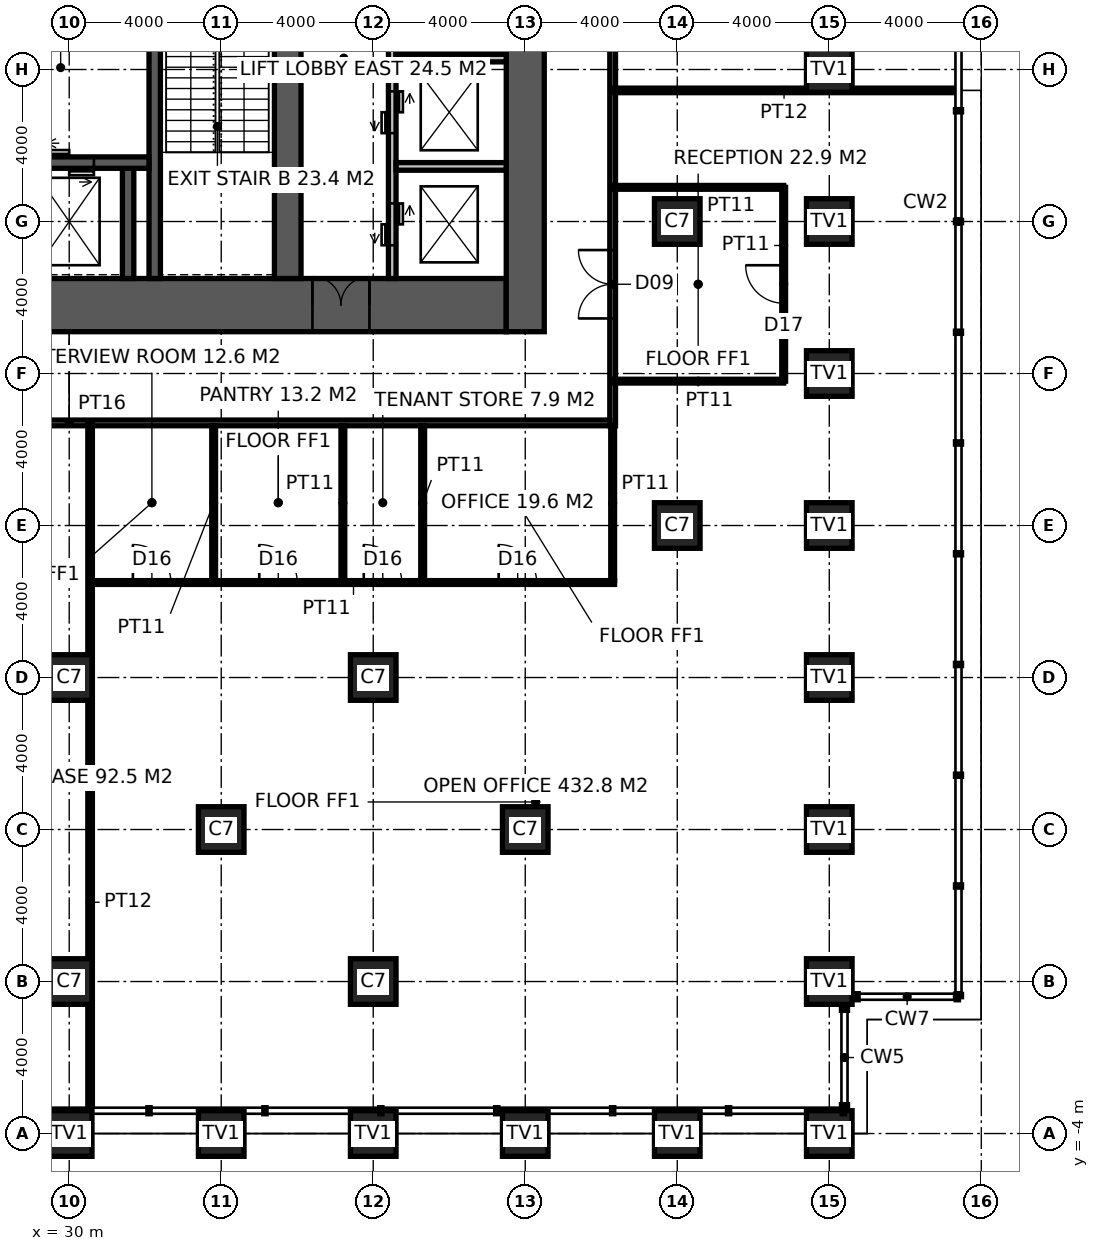
"""IFC4 building model, lengths in metres.
Left out: names, types, materials, properties, quantities, classifications, styles, units other than length and angle.
Written with IfcOpenShell. Run it as: python <this file> out.ifc"""

import sys

from ifc_helpers import new_model, si_unit, direction, frame, frame_2d, origin, origin_2d, place, context, subcontext, project, spatial, rectangle, hollow_rectangle, extrude, element, fill, save


model = new_model("IFC4")
c1 = context("Model", 3, precision=1e-05, world=origin(), true_north=direction((0.0, 1.0)))
c2 = subcontext(c1, "Body", "Model", "MODEL_VIEW")
j1 = project(units=[si_unit("LENGTHUNIT", "METRE"), si_unit("PLANEANGLEUNIT", "RADIAN")], contexts=[c1])
p1 = place(None, origin())
s1 = spatial("IfcSite", under=j1, at=p1, CompositionType="ELEMENT")
p2 = place(p1, origin())
s2 = spatial("IfcBuilding", under=s1, at=p2, CompositionType="ELEMENT")
p3 = place(p2, frame((0.0, 0.0, 11.0)))
s3 = spatial("IfcBuildingStorey", under=s2, at=p3, CompositionType="ELEMENT", Elevation=11.0)
for number, where, z_axis, x_axis in (
    (1, (30.0, -4.0, 0.0), (0.0, 0.0, 1.0), (1.0, 0.0, 0.0)),
    (2, (34.0, -4.0, 0.0), (0.0, 0.0, 1.0), (1.0, 0.0, 0.0)),
    (3, (38.0, -4.0, 0.0), (0.0, 0.0, 1.0), (1.0, 0.0, 0.0)),
    (4, (42.0, -4.0, 0.0), (0.0, 0.0, 1.0), (1.0, 0.0, 0.0)),
    (5, (46.0, -4.0, 0.0), (0.0, 0.0, 1.0), (1.0, 0.0, 0.0)),
    (6, (50.0, -4.0, 0.0), (0.0, 0.0, 1.0), (1.0, 0.0, 0.0)),
    (7, (50.0, 0.0, 0.0), (0.0, 0.0, 1.0), (1.0, 0.0, 0.0)),
    (8, (50.0, 4.0, 0.0), (0.0, 0.0, 1.0), (1.0, 0.0, 0.0)),
    (9, (50.0, 8.0, 0.0), (0.0, 0.0, 1.0), (1.0, 0.0, 0.0)),
    (10, (50.0, 12.0, 0.0), (0.0, 0.0, 1.0), (1.0, 0.0, 0.0)),
    (11, (50.0, 16.0, 0.0), (0.0, 0.0, 1.0), (1.0, 0.0, 0.0)),
    (12, (50.0, 20.0, 0.0), (0.0, 0.0, 1.0), (1.0, 0.0, 0.0)),
    (13, (50.0, 24.0, 0.0), (0.0, 0.0, 1.0), (1.0, 0.0, 0.0)),
):
    element("IfcColumn", number, at=place(p3, frame(where, z_axis=z_axis, x_axis=x_axis)), inside=s3, PredefinedType="USERDEFINED", context=c2, shape_type="SweptSolid", body=[
        extrude(hollow_rectangle(XDim=1.2, YDim=1.2, WallThickness=0.1, at=origin_2d()), origin(), (0.0, 0.0, 1.0), 4.0),
    ])
for number, where, z_axis, x_axis in (
    (14, (30.0, 0.0, 0.0), (0.0, 0.0, 1.0), (1.0, 0.0, 0.0)),
    (15, (30.0, 8.0, 0.0), (0.0, 0.0, 1.0), (1.0, 0.0, 0.0)),
    (16, (34.0, 4.0, 0.0), (0.0, 0.0, 1.0), (1.0, 0.0, 0.0)),
    (17, (38.0, 0.0, 0.0), (0.0, 0.0, 1.0), (1.0, 0.0, 0.0)),
    (18, (38.0, 8.0, 0.0), (0.0, 0.0, 1.0), (1.0, 0.0, 0.0)),
    (19, (42.0, 4.0, 0.0), (0.0, 0.0, 1.0), (1.0, 0.0, 0.0)),
    (20, (46.0, 12.0, 0.0), (0.0, 0.0, 1.0), (1.0, 0.0, 0.0)),
    (21, (46.0, 20.0, 0.0), (0.0, 0.0, 1.0), (1.0, 0.0, 0.0)),
):
    element("IfcColumn", number, at=place(p3, frame(where, z_axis=z_axis, x_axis=x_axis)), inside=s3, PredefinedType="COLUMN", context=c2, shape_type="SweptSolid", body=[
        extrude(hollow_rectangle(XDim=1.2, YDim=1.2, WallThickness=0.1, at=origin_2d()), origin(), (0.0, 0.0, 1.0), 4.0),
    ])
p4 = place(p3, frame((18.5, 17.8, -0.15), z_axis=(0.0, 0.0, 1.0), x_axis=(1.0, 0.0, 0.0)))
e22 = element("IfcWall", 22, at=p4, inside=s3, PredefinedType="SHEAR", context=c2, shape_type="SweptSolid", body=[
    extrude(rectangle(XDim=23.0, YDim=1.4, at=frame_2d((11.5, 0.0))), origin(), (0.0, 0.0, 1.0), 4.0),
])
p5 = place(p4, frame((3.45, 0.0, 0.15)))
e23 = element("IfcOpeningElement", 23, at=p5, cuts=e22, PredefinedType="OPENING", context=c2, shape_type="SweptSolid", body=[
    extrude(rectangle(XDim=1.5, YDim=2.4, at=frame_2d((0.75, 1.2))), frame((0.0, 0.71, 0.0), z_axis=(0.0, -1.0, 0.0), x_axis=(1.0, 0.0, 0.0)), (0.0, 0.0, 1.0), 1.42),
])
p6 = place(p4, frame((17.9, 0.0, 0.15)))
e24 = element("IfcOpeningElement", 24, at=p6, cuts=e22, PredefinedType="OPENING", context=c2, shape_type="SweptSolid", body=[
    extrude(rectangle(XDim=1.5, YDim=2.4, at=frame_2d((0.75, 1.2))), frame((0.0, 0.71, 0.0), z_axis=(0.0, -1.0, 0.0), x_axis=(1.0, 0.0, 0.0)), (0.0, 0.0, 1.0), 1.42),
])
p7 = place(p4, frame((0.9, 0.0, 0.15)))
e25 = element("IfcOpeningElement", 25, at=p7, cuts=e22, PredefinedType="OPENING", context=c2, shape_type="SweptSolid", body=[
    extrude(rectangle(XDim=1.0, YDim=2.2, at=frame_2d((0.5, 1.1))), frame((0.0, 0.71, 0.0), z_axis=(0.0, -1.0, 0.0), x_axis=(1.0, 0.0, 0.0)), (0.0, 0.0, 1.0), 1.42),
])
p8 = place(p3, frame((42.0, 17.1, -0.15), z_axis=(0.0, 0.0, 1.0), x_axis=(0.0, 1.0, 0.0)))
e26 = element("IfcWall", 26, at=p8, inside=s3, PredefinedType="SHEAR", context=c2, shape_type="SweptSolid", body=[
    extrude(rectangle(XDim=19.8, YDim=1.0, at=frame_2d((9.9, 0.0))), origin(), (0.0, 0.0, 1.0), 4.0),
])
p9 = place(p3, frame((35.75, 18.5, -0.15), z_axis=(0.0, 0.0, 1.0), x_axis=(0.0, 1.0, 0.0)))
e27 = element("IfcWall", 27, at=p9, inside=s3, PredefinedType="SHEAR", context=c2, shape_type="SweptSolid", body=[
    extrude(rectangle(XDim=17.0, YDim=0.7, at=frame_2d((8.5, 0.0))), origin(), (0.0, 0.0, 1.0), 4.0),
])
p10 = place(p9, frame((9.85, 0.0, 0.15)))
e28 = element("IfcOpeningElement", 28, at=p10, cuts=e27, PredefinedType="OPENING", context=c2, shape_type="SweptSolid", body=[
    extrude(rectangle(XDim=1.0, YDim=2.2, at=frame_2d((0.5, 1.1))), frame((0.0, 0.36, 0.0), z_axis=(0.0, -1.0, 0.0), x_axis=(1.0, 0.0, 0.0)), (0.0, 0.0, 1.0), 0.72),
])
p11 = place(p3, frame((32.25, 18.5, -0.15), z_axis=(0.0, 0.0, 1.0), x_axis=(0.0, 1.0, 0.0)))
e29 = element("IfcWall", 29, at=p11, inside=s3, PredefinedType="SHEAR", context=c2, shape_type="SweptSolid", body=[
    extrude(rectangle(XDim=7.9, YDim=0.3, at=frame_2d((3.95, 0.0))), origin(), (0.0, 0.0, 1.0), 4.0),
])
p12 = place(p3, frame((31.55, 18.5, -0.15), z_axis=(0.0, 0.0, 1.0), x_axis=(0.0, 1.0, 0.0)))
e30 = element("IfcWall", 30, at=p12, inside=s3, PredefinedType="SHEAR", context=c2, shape_type="SweptSolid", body=[
    extrude(rectangle(XDim=2.9, YDim=0.3, at=frame_2d((1.45, 0.0))), origin(), (0.0, 0.0, 1.0), 4.0),
])
p13 = place(p3, frame((28.3, 21.55, -0.15), z_axis=(0.0, 0.0, 1.0), x_axis=(1.0, 0.0, 0.0)))
e31 = element("IfcWall", 31, at=p13, inside=s3, PredefinedType="SHEAR", context=c2, shape_type="SweptSolid", body=[
    extrude(rectangle(XDim=3.8, YDim=0.3, at=frame_2d((1.9, 0.0))), origin(), (0.0, 0.0, 1.0), 4.0),
])
p14 = place(p13, frame((1.05, 0.0, 0.15)))
e32 = element("IfcOpeningElement", 32, at=p14, cuts=e31, PredefinedType="OPENING", context=c2, shape_type="SweptSolid", body=[
    extrude(rectangle(XDim=1.3, YDim=2.4, at=frame_2d((0.65, 1.2))), frame((0.0, 0.16, 0.0), z_axis=(0.0, -1.0, 0.0), x_axis=(1.0, 0.0, 0.0)), (0.0, 0.0, 1.0), 0.32),
])
p15 = place(p3, frame((38.5, 18.5, -0.15), z_axis=(0.0, 0.0, 1.0), x_axis=(0.0, 1.0, 0.0)))
e33 = element("IfcWall", 33, at=p15, inside=s3, PredefinedType="SOLIDWALL", context=c2, shape_type="SweptSolid", body=[
    extrude(rectangle(XDim=11.5, YDim=0.2, at=frame_2d((5.75, 0.0))), origin(), (0.0, 0.0, 1.0), 4.0),
])
p16 = place(p15, frame((0.875, 0.0, 0.15)))
e34 = element("IfcOpeningElement", 34, at=p16, cuts=e33, PredefinedType="OPENING", context=c2, shape_type="SweptSolid", body=[
    extrude(rectangle(XDim=1.1, YDim=2.2, at=frame_2d((0.55, 1.1))), frame((0.0, 0.11, 0.0), z_axis=(0.0, -1.0, 0.0), x_axis=(1.0, 0.0, 0.0)), (0.0, 0.0, 1.0), 0.22),
])
p17 = place(p15, frame((3.825, 0.0, 0.15)))
e35 = element("IfcOpeningElement", 35, at=p17, cuts=e33, PredefinedType="OPENING", context=c2, shape_type="SweptSolid", body=[
    extrude(rectangle(XDim=1.1, YDim=2.2, at=frame_2d((0.55, 1.1))), frame((0.0, 0.11, 0.0), z_axis=(0.0, -1.0, 0.0), x_axis=(1.0, 0.0, 0.0)), (0.0, 0.0, 1.0), 0.22),
])
p18 = place(p15, frame((6.675, 0.0, 0.15)))
e36 = element("IfcOpeningElement", 36, at=p18, cuts=e33, PredefinedType="OPENING", context=c2, shape_type="SweptSolid", body=[
    extrude(rectangle(XDim=1.1, YDim=2.2, at=frame_2d((0.55, 1.1))), frame((0.0, 0.11, 0.0), z_axis=(0.0, -1.0, 0.0), x_axis=(1.0, 0.0, 0.0)), (0.0, 0.0, 1.0), 0.22),
])
p19 = place(p15, frame((9.575, 0.0, 0.15)))
e37 = element("IfcOpeningElement", 37, at=p19, cuts=e33, PredefinedType="OPENING", context=c2, shape_type="SweptSolid", body=[
    extrude(rectangle(XDim=1.1, YDim=2.2, at=frame_2d((0.55, 1.1))), frame((0.0, 0.11, 0.0), z_axis=(0.0, -1.0, 0.0), x_axis=(1.0, 0.0, 0.0)), (0.0, 0.0, 1.0), 0.22),
])
for number, where, z_axis, x_axis in (
    (38, (38.6, 21.45, -0.15), (0.0, 0.0, 1.0), (1.0, 0.0, 0.0)),
    (39, (38.6, 24.3, -0.15), (0.0, 0.0, 1.0), (1.0, 0.0, 0.0)),
):
    element("IfcWall", number, at=place(p3, frame(where, z_axis=z_axis, x_axis=x_axis)), inside=s3, PredefinedType="SOLIDWALL", context=c2, shape_type="SweptSolid", body=[
        extrude(rectangle(XDim=2.9, YDim=0.2, at=frame_2d((1.45, 0.0))), origin(), (0.0, 0.0, 1.0), 4.0),
    ])
p20 = place(p3, frame((44.3, 14.625, 0.0), z_axis=(0.0, 0.0, 1.0), x_axis=(0.0, 1.0, 0.0)))
e40 = element("IfcWall", 40, at=p20, inside=s3, PredefinedType="PARTITIONING", context=c2, shape_type="SweptSolid", body=[
    extrude(rectangle(XDim=24.15, YDim=0.15, at=frame_2d((12.075, 0.0))), origin(), (0.0, 0.0, 1.0), 3.85),
])
p21 = place(p20, frame((2.824, 0.0, 0.0)))
e41 = element("IfcOpeningElement", 41, at=p21, cuts=e40, PredefinedType="OPENING", context=c2, shape_type="SweptSolid", body=[
    extrude(rectangle(XDim=1.8, YDim=2.4, at=frame_2d((0.9, 1.2))), frame((0.0, 0.085, 0.0), z_axis=(0.0, -1.0, 0.0), x_axis=(1.0, 0.0, 0.0)), (0.0, 0.0, 1.0), 0.17),
])
p22 = place(p20, frame((18.075, 0.0, 0.0)))
e42 = element("IfcOpeningElement", 42, at=p22, cuts=e40, PredefinedType="OPENING", context=c2, shape_type="SweptSolid", body=[
    extrude(rectangle(XDim=1.8, YDim=2.4, at=frame_2d((0.9, 1.2))), frame((0.0, 0.085, 0.0), z_axis=(0.0, -1.0, 0.0), x_axis=(1.0, 0.0, 0.0)), (0.0, 0.0, 1.0), 0.17),
])
p23 = place(p20, frame((10.875, 0.0, 0.0)))
e43 = element("IfcOpeningElement", 43, at=p23, cuts=e40, PredefinedType="OPENING", context=c2, shape_type="SweptSolid", body=[
    extrude(rectangle(XDim=1.0, YDim=2.2, at=frame_2d((0.5, 1.1))), frame((0.0, 0.085, 0.0), z_axis=(0.0, -1.0, 0.0), x_axis=(1.0, 0.0, 0.0)), (0.0, 0.0, 1.0), 0.17),
])
p24 = place(p3, frame((15.775, 14.7, 0.0), z_axis=(0.0, 0.0, 1.0), x_axis=(1.0, 0.0, 0.0)))
e44 = element("IfcWall", 44, at=p24, inside=s3, PredefinedType="PARTITIONING", context=c2, shape_type="SweptSolid", body=[
    extrude(rectangle(XDim=28.45, YDim=0.15, at=frame_2d((14.225, 0.0))), origin(), (0.0, 0.0, 1.0), 3.85),
])
p25 = place(p24, frame((11.725, 0.0, 0.0)))
e45 = element("IfcOpeningElement", 45, at=p25, cuts=e44, PredefinedType="OPENING", context=c2, shape_type="SweptSolid", body=[
    extrude(rectangle(XDim=1.0, YDim=2.2, at=frame_2d((0.5, 1.1))), frame((0.0, 0.085, 0.0), z_axis=(0.0, -1.0, 0.0), x_axis=(1.0, 0.0, 0.0)), (0.0, 0.0, 1.0), 0.17),
])
p26 = place(p3, frame((30.55, -3.32, 0.0), z_axis=(0.0, 0.0, 1.0), x_axis=(0.0, 1.0, 0.0)))
e46 = element("IfcWall", 46, at=p26, inside=s3, PredefinedType="PARTITIONING", context=c2, shape_type="SweptSolid", body=[
    extrude(rectangle(XDim=18.02, YDim=0.12, at=frame_2d((9.01, 0.0))), origin(), (0.0, 0.0, 1.0), 2.65),
])
p27 = place(p3, frame((44.3, 23.45, 0.0), z_axis=(0.0, 0.0, 1.0), x_axis=(1.0, 0.0, 0.0)))
e47 = element("IfcWall", 47, at=p27, inside=s3, PredefinedType="PARTITIONING", context=c2, shape_type="SweptSolid", body=[
    extrude(rectangle(XDim=9.02, YDim=0.12, at=frame_2d((4.51, 0.0))), origin(), (0.0, 0.0, 1.0), 3.85),
])
p28 = place(p3, frame((30.611, 10.5, 0.0), z_axis=(0.0, 0.0, 1.0), x_axis=(1.0, 0.0, 0.0)))
e48 = element("IfcWall", 48, at=p28, inside=s3, PredefinedType="PARTITIONING", context=c2, shape_type="SweptSolid", body=[
    extrude(rectangle(XDim=13.739, YDim=0.1, at=frame_2d((6.87, 0.0))), origin(), (0.0, 0.0, 1.0), 3.85),
])
p29 = place(p28, frame((1.065, 0.0, 0.0)))
e49 = element("IfcOpeningElement", 49, at=p29, cuts=e48, PredefinedType="OPENING", context=c2, shape_type="SweptSolid", body=[
    extrude(rectangle(XDim=1.0, YDim=2.2, at=frame_2d((0.5, 1.1))), frame((0.0, 0.06, 0.0), z_axis=(0.0, -1.0, 0.0), x_axis=(1.0, 0.0, 0.0)), (0.0, 0.0, 1.0), 0.12),
])
p30 = place(p28, frame((4.39, 0.0, 0.0)))
e50 = element("IfcOpeningElement", 50, at=p30, cuts=e48, PredefinedType="OPENING", context=c2, shape_type="SweptSolid", body=[
    extrude(rectangle(XDim=1.0, YDim=2.2, at=frame_2d((0.5, 1.1))), frame((0.0, 0.06, 0.0), z_axis=(0.0, -1.0, 0.0), x_axis=(1.0, 0.0, 0.0)), (0.0, 0.0, 1.0), 0.12),
])
p31 = place(p28, frame((7.14, 0.0, 0.0)))
e51 = element("IfcOpeningElement", 51, at=p31, cuts=e48, PredefinedType="OPENING", context=c2, shape_type="SweptSolid", body=[
    extrude(rectangle(XDim=1.0, YDim=2.2, at=frame_2d((0.5, 1.1))), frame((0.0, 0.06, 0.0), z_axis=(0.0, -1.0, 0.0), x_axis=(1.0, 0.0, 0.0)), (0.0, 0.0, 1.0), 0.12),
])
p32 = place(p28, frame((10.689, 0.0, 0.0)))
e52 = element("IfcOpeningElement", 52, at=p32, cuts=e48, PredefinedType="OPENING", context=c2, shape_type="SweptSolid", body=[
    extrude(rectangle(XDim=1.0, YDim=2.2, at=frame_2d((0.5, 1.1))), frame((0.0, 0.06, 0.0), z_axis=(0.0, -1.0, 0.0), x_axis=(1.0, 0.0, 0.0)), (0.0, 0.0, 1.0), 0.12),
])
for number, where, z_axis, x_axis in (
    (53, (33.801, 10.55, 0.0), (0.0, 0.0, 1.0), (0.0, 1.0, 0.0)),
    (54, (37.201, 10.55, 0.0), (0.0, 0.0, 1.0), (0.0, 1.0, 0.0)),
    (55, (39.301, 10.55, 0.0), (0.0, 0.0, 1.0), (0.0, 1.0, 0.0)),
    (56, (44.3, 10.55, 0.0), (0.0, 0.0, 1.0), (0.0, 1.0, 0.0)),
):
    element("IfcWall", number, at=place(p3, frame(where, z_axis=z_axis, x_axis=x_axis)), inside=s3, PredefinedType="PARTITIONING", context=c2, shape_type="SweptSolid", body=[
        extrude(rectangle(XDim=4.075, YDim=0.1, at=frame_2d((2.038, 0.0))), origin(), (0.0, 0.0, 1.0), 3.85),
    ])
p33 = place(p3, frame((44.3, 15.799, 0.0), z_axis=(0.0, 0.0, 1.0), x_axis=(1.0, 0.0, 0.0)))
e57 = element("IfcWall", 57, at=p33, inside=s3, PredefinedType="PARTITIONING", context=c2, shape_type="SweptSolid", body=[
    extrude(rectangle(XDim=4.5, YDim=0.1, at=frame_2d((2.25, 0.0))), origin(), (0.0, 0.0, 1.0), 3.85),
])
p34 = place(p3, frame((48.8, 15.799, 0.0), z_axis=(0.0, 0.0, 1.0), x_axis=(0.0, 1.0, 0.0)))
e58 = element("IfcWall", 58, at=p34, inside=s3, PredefinedType="PARTITIONING", context=c2, shape_type="SweptSolid", body=[
    extrude(rectangle(XDim=5.1, YDim=0.1, at=frame_2d((2.55, 0.0))), origin(), (0.0, 0.0, 1.0), 3.85),
])
p35 = place(p34, frame((2.05, 0.0, 0.0)))
e59 = element("IfcOpeningElement", 59, at=p35, cuts=e58, PredefinedType="OPENING", context=c2, shape_type="SweptSolid", body=[
    extrude(rectangle(XDim=1.0, YDim=2.2, at=frame_2d((0.5, 1.1))), frame((0.0, 0.06, 0.0), z_axis=(0.0, -1.0, 0.0), x_axis=(1.0, 0.0, 0.0)), (0.0, 0.0, 1.0), 0.12),
])
p36 = place(p3, frame((48.8, 20.899, 0.0), z_axis=(0.0, 0.0, 1.0), x_axis=(-1.0, 0.0, 0.0)))
e60 = element("IfcWall", 60, at=p36, inside=s3, PredefinedType="PARTITIONING", context=c2, shape_type="SweptSolid", body=[
    extrude(rectangle(XDim=4.5, YDim=0.1, at=frame_2d((2.25, 0.0))), origin(), (0.0, 0.0, 1.0), 3.85),
])
p37 = place(p6, origin())
e61 = element("IfcDoor", 61, at=p37, inside=s3, OperationType="DOUBLE_DOOR_DOUBLE_SWING", PredefinedType="DOOR", context=c2, shape_type="SweptSolid", body=[
    extrude(rectangle(XDim=1.5, YDim=2.4, at=frame_2d((0.75, 1.2))), frame((0.0, 0.025, 0.0), z_axis=(0.0, -1.0, 0.0), x_axis=(1.0, 0.0, 0.0)), (0.0, 0.0, 1.0), 0.05),
])
fill(e24, e61)
p38 = place(p21, origin())
e62 = element("IfcDoor", 62, at=p38, inside=s3, OperationType="DOUBLE_DOOR_DOUBLE_SWING", PredefinedType="DOOR", context=c2, shape_type="SweptSolid", body=[
    extrude(rectangle(XDim=1.8, YDim=2.4, at=frame_2d((0.9, 1.2))), frame((0.0, 0.025, 0.0), z_axis=(0.0, -1.0, 0.0), x_axis=(1.0, 0.0, 0.0)), (0.0, 0.0, 1.0), 0.05),
])
fill(e41, e62)
p39 = place(p29, origin())
e63 = element("IfcDoor", 63, at=p39, inside=s3, OperationType="SINGLE_SWING_LEFT", PredefinedType="DOOR", context=c2, shape_type="SweptSolid", body=[
    extrude(rectangle(XDim=1.0, YDim=2.2, at=frame_2d((0.5, 1.1))), frame((0.0, 0.025, 0.0), z_axis=(0.0, -1.0, 0.0), x_axis=(1.0, 0.0, 0.0)), (0.0, 0.0, 1.0), 0.05),
])
fill(e49, e63)
p40 = place(p30, origin())
e64 = element("IfcDoor", 64, at=p40, inside=s3, OperationType="SINGLE_SWING_LEFT", PredefinedType="DOOR", context=c2, shape_type="SweptSolid", body=[
    extrude(rectangle(XDim=1.0, YDim=2.2, at=frame_2d((0.5, 1.1))), frame((0.0, 0.025, 0.0), z_axis=(0.0, -1.0, 0.0), x_axis=(1.0, 0.0, 0.0)), (0.0, 0.0, 1.0), 0.05),
])
fill(e50, e64)
p41 = place(p31, origin())
e65 = element("IfcDoor", 65, at=p41, inside=s3, OperationType="SINGLE_SWING_LEFT", PredefinedType="DOOR", context=c2, shape_type="SweptSolid", body=[
    extrude(rectangle(XDim=1.0, YDim=2.2, at=frame_2d((0.5, 1.1))), frame((0.0, 0.025, 0.0), z_axis=(0.0, -1.0, 0.0), x_axis=(1.0, 0.0, 0.0)), (0.0, 0.0, 1.0), 0.05),
])
fill(e51, e65)
p42 = place(p32, origin())
e66 = element("IfcDoor", 66, at=p42, inside=s3, OperationType="SINGLE_SWING_LEFT", PredefinedType="DOOR", context=c2, shape_type="SweptSolid", body=[
    extrude(rectangle(XDim=1.0, YDim=2.2, at=frame_2d((0.5, 1.1))), frame((0.0, 0.025, 0.0), z_axis=(0.0, -1.0, 0.0), x_axis=(1.0, 0.0, 0.0)), (0.0, 0.0, 1.0), 0.05),
])
fill(e52, e66)
p43 = place(p35, origin())
e67 = element("IfcDoor", 67, at=p43, inside=s3, OperationType="SINGLE_SWING_RIGHT", PredefinedType="DOOR", context=c2, shape_type="SweptSolid", body=[
    extrude(rectangle(XDim=1.0, YDim=2.2, at=frame_2d((0.5, 1.1))), frame((0.0, 0.025, 0.0), z_axis=(0.0, -1.0, 0.0), x_axis=(1.0, 0.0, 0.0)), (0.0, 0.0, 1.0), 0.05),
])
fill(e59, e67)
p44 = place(p14, origin())
e68 = element("IfcDoor", 68, at=p44, inside=s3, OperationType="DOUBLE_DOOR_SLIDING", PredefinedType="DOOR", context=c2, shape_type="SweptSolid", body=[
    extrude(rectangle(XDim=1.3, YDim=2.4, at=frame_2d((0.65, 1.2))), frame((0.0, 0.025, 0.0), z_axis=(0.0, -1.0, 0.0), x_axis=(1.0, 0.0, 0.0)), (0.0, 0.0, 1.0), 0.05),
])
fill(e32, e68)
p45 = place(p16, origin())
e69 = element("IfcDoor", 69, at=p45, inside=s3, OperationType="DOUBLE_DOOR_SLIDING", PredefinedType="DOOR", context=c2, shape_type="SweptSolid", body=[
    extrude(rectangle(XDim=1.1, YDim=2.2, at=frame_2d((0.55, 1.1))), frame((0.0, 0.025, 0.0), z_axis=(0.0, -1.0, 0.0), x_axis=(1.0, 0.0, 0.0)), (0.0, 0.0, 1.0), 0.05),
])
fill(e34, e69)
p46 = place(p17, origin())
e70 = element("IfcDoor", 70, at=p46, inside=s3, OperationType="DOUBLE_DOOR_SLIDING", PredefinedType="DOOR", context=c2, shape_type="SweptSolid", body=[
    extrude(rectangle(XDim=1.1, YDim=2.2, at=frame_2d((0.55, 1.1))), frame((0.0, 0.025, 0.0), z_axis=(0.0, -1.0, 0.0), x_axis=(1.0, 0.0, 0.0)), (0.0, 0.0, 1.0), 0.05),
])
fill(e35, e70)
save(model, sys.argv[1])
